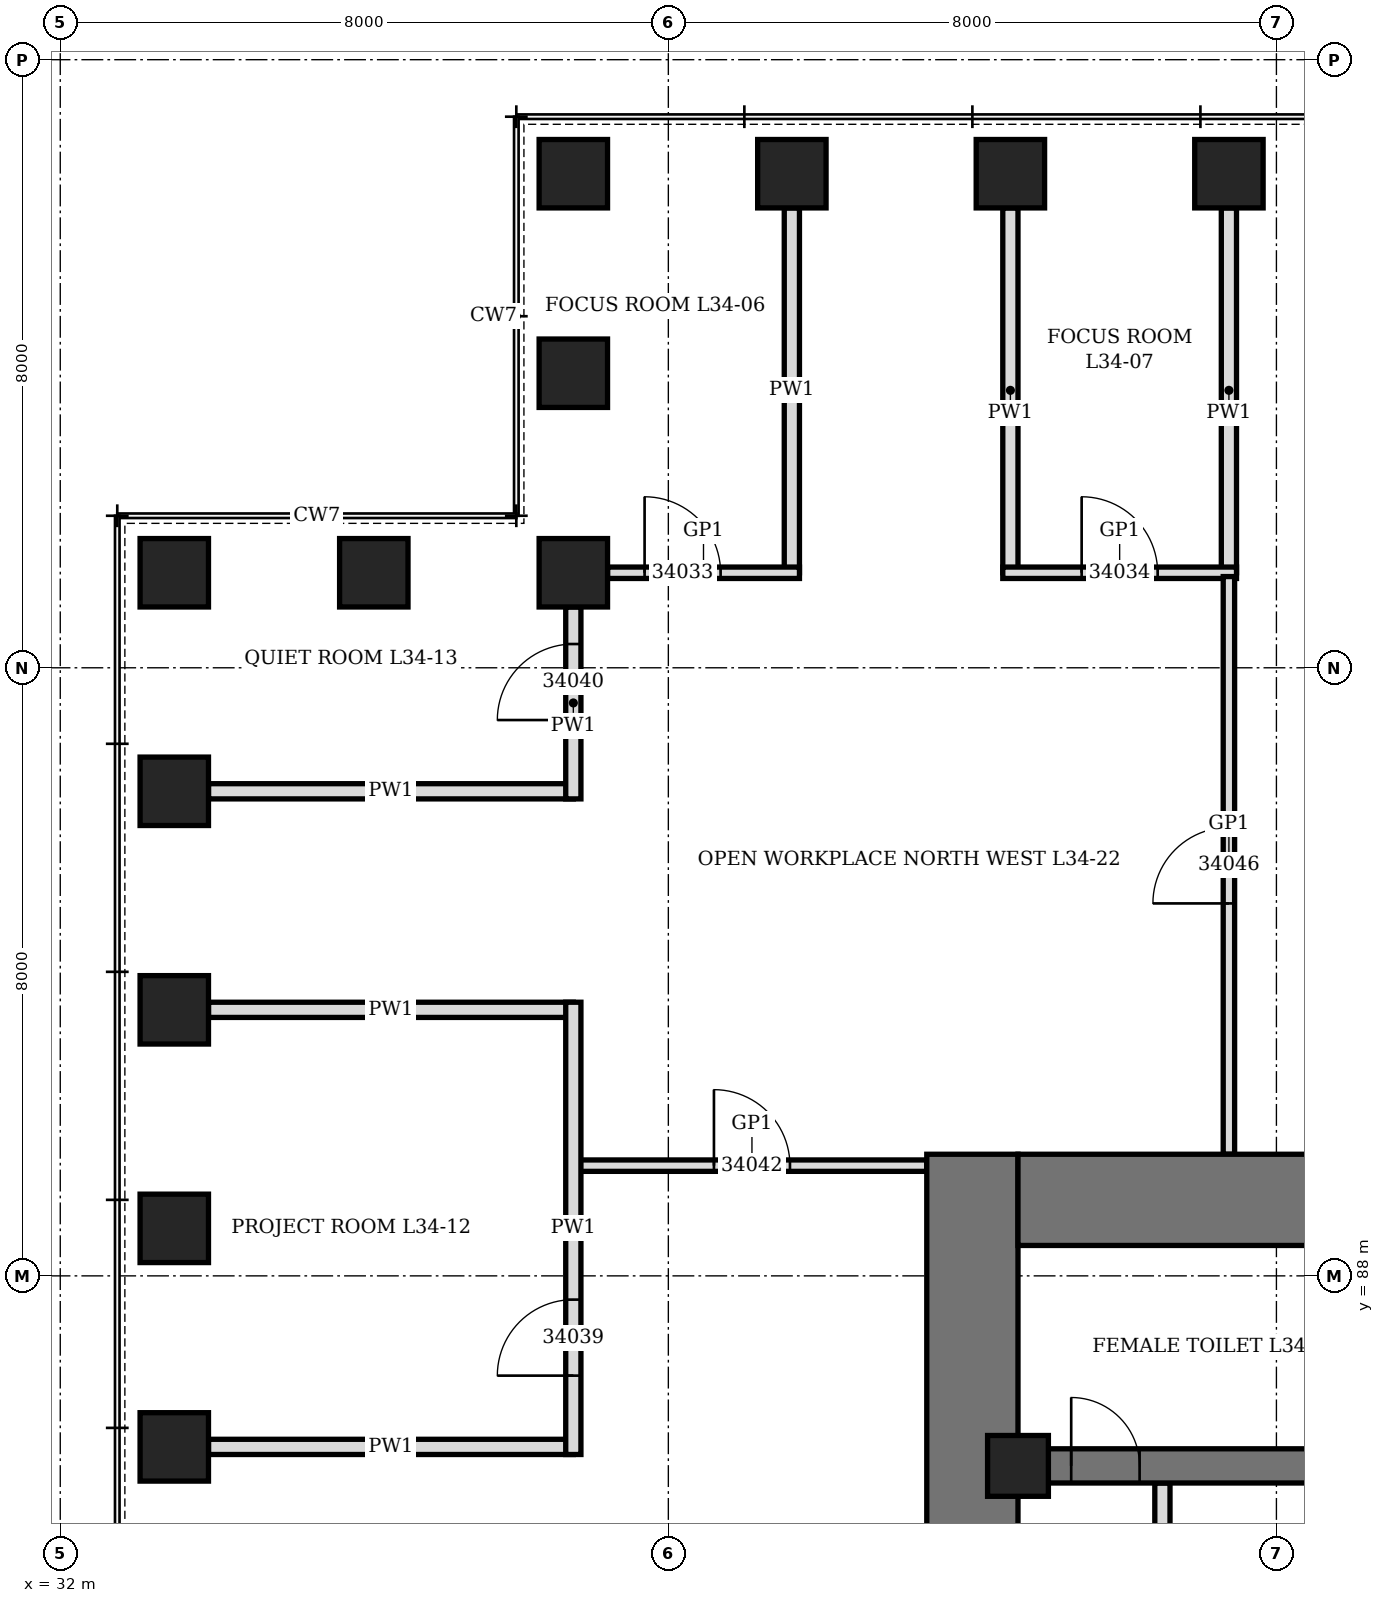
"""IFC4 building model, lengths in metres.
Left out: names, types, materials, properties, quantities, classifications, styles, units other than length and angle.
Written with IfcOpenShell. Run it as: python <this file> out.ifc"""

import sys

from ifc_helpers import new_model, si_unit, direction, frame, frame_2d, origin, origin_2d, place, context, subcontext, project, spatial, rectangle, hollow_rectangle, extrude, element, fill, save


model = new_model("IFC4")
c1 = context("Model", 3, precision=1e-05, world=origin(), true_north=direction((0.0, 1.0)))
c2 = subcontext(c1, "Body", "Model", "MODEL_VIEW")
j1 = project(units=[si_unit("LENGTHUNIT", "METRE"), si_unit("PLANEANGLEUNIT", "RADIAN")], contexts=[c1])
p1 = place(None, origin())
s1 = spatial("IfcSite", under=j1, at=p1, CompositionType="ELEMENT")
p2 = place(p1, origin())
s2 = spatial("IfcBuilding", under=s1, at=p2, CompositionType="ELEMENT")
p3 = place(p2, frame((0.0, 0.0, 154.3)))
s3 = spatial("IfcBuildingStorey", under=s2, at=p3, CompositionType="ELEMENT", Elevation=154.3)
for number, where, z_axis, x_axis in (
    (1, (47.375, 102.5, 0.0), (0.0, 0.0, 1.0), (1.0, 0.0, 0.0)),
    (2, (44.5, 102.5, 0.0), (0.0, 0.0, 1.0), (1.0, 0.0, 0.0)),
    (3, (41.625, 102.5, 0.0), (0.0, 0.0, 1.0), (1.0, 0.0, 0.0)),
    (4, (38.75, 102.5, 0.0), (0.0, 0.0, 1.0), (0.0, 1.0, 0.0)),
    (5, (38.75, 99.875, 0.0), (0.0, 0.0, 1.0), (0.0, 1.0, 0.0)),
    (6, (38.75, 97.25, 0.0), (0.0, 0.0, 1.0), (1.0, 0.0, 0.0)),
    (7, (36.125, 97.25, 0.0), (0.0, 0.0, 1.0), (1.0, 0.0, 0.0)),
    (8, (33.5, 97.25, 0.0), (0.0, 0.0, 1.0), (0.0, 1.0, 0.0)),
    (9, (33.5, 94.375, 0.0), (0.0, 0.0, 1.0), (0.0, 1.0, 0.0)),
    (10, (33.5, 91.5, 0.0), (0.0, 0.0, 1.0), (0.0, 1.0, 0.0)),
    (11, (33.5, 88.625, 0.0), (0.0, 0.0, 1.0), (0.0, 1.0, 0.0)),
    (12, (33.5, 85.75, 0.0), (0.0, 0.0, 1.0), (0.0, 1.0, 0.0)),
):
    element("IfcColumn", number, at=place(p3, frame(where, z_axis=z_axis, x_axis=x_axis)), inside=s3, PredefinedType="COLUMN", context=c2, shape_type="SweptSolid", body=[
        extrude(hollow_rectangle(XDim=0.9, YDim=0.9, WallThickness=0.12, at=origin_2d()), origin(), (0.0, 0.0, 1.0), 4.2),
    ])
p4 = place(p3, frame((44.0, 70.4, 0.0), z_axis=(0.0, 0.0, 1.0), x_axis=(0.0, 1.0, 0.0)))
e13 = element("IfcWall", 13, at=p4, inside=s3, PredefinedType="SHEAR", context=c2, shape_type="SweptSolid", body=[
    extrude(rectangle(XDim=19.2, YDim=1.2, at=frame_2d((9.6, 0.0))), origin(), (0.0, 0.0, 1.0), 4.2),
])
p5 = place(p4, frame((8.6, 0.0, 0.0)))
e14 = element("IfcOpeningElement", 14, at=p5, cuts=e13, PredefinedType="OPENING", context=c2, shape_type="SweptSolid", body=[
    extrude(rectangle(XDim=2.0, YDim=2.4, at=frame_2d((1.0, 1.2))), frame((0.0, 0.61, 0.0), z_axis=(0.0, -1.0, 0.0), x_axis=(1.0, 0.0, 0.0)), (0.0, 0.0, 1.0), 1.22),
])
p6 = place(p3, frame((44.6, 89.0, 0.0), z_axis=(0.0, 0.0, 1.0), x_axis=(1.0, 0.0, 0.0)))
e15 = element("IfcWall", 15, at=p6, inside=s3, PredefinedType="SHEAR", context=c2, shape_type="SweptSolid", body=[
    extrude(rectangle(XDim=22.8, YDim=1.2, at=frame_2d((11.4, 0.0))), origin(), (0.0, 0.0, 1.0), 4.2),
])
p7 = place(p6, frame((9.275, 0.0, 0.0)))
e16 = element("IfcOpeningElement", 16, at=p7, cuts=e15, PredefinedType="OPENING", context=c2, shape_type="SweptSolid", body=[
    extrude(rectangle(XDim=1.0, YDim=2.1, at=frame_2d((0.5, 1.05))), frame((0.0, 0.61, 0.0), z_axis=(0.0, -1.0, 0.0), x_axis=(1.0, 0.0, 0.0)), (0.0, 0.0, 1.0), 1.22),
])
p8 = place(p6, frame((6.45, 0.0, 0.0)))
e17 = element("IfcOpeningElement", 17, at=p8, cuts=e15, PredefinedType="OPENING", context=c2, shape_type="SweptSolid", body=[
    extrude(rectangle(XDim=0.9, YDim=2.1, at=frame_2d((0.45, 1.05))), frame((0.0, 0.61, 0.0), z_axis=(0.0, -1.0, 0.0), x_axis=(1.0, 0.0, 0.0)), (0.0, 0.0, 1.0), 1.22),
])
p9 = place(p6, frame((13.012, 0.0, 0.0)))
e18 = element("IfcOpeningElement", 18, at=p9, cuts=e15, PredefinedType="OPENING", context=c2, shape_type="SweptSolid", body=[
    extrude(rectangle(XDim=0.9, YDim=2.1, at=frame_2d((0.45, 1.05))), frame((0.0, 0.61, 0.0), z_axis=(0.0, -1.0, 0.0), x_axis=(1.0, 0.0, 0.0)), (0.0, 0.0, 1.0), 1.22),
])
p10 = place(p3, frame((44.6, 85.5, 0.0), z_axis=(0.0, 0.0, 1.0), x_axis=(1.0, 0.0, 0.0)))
e19 = element("IfcWall", 19, at=p10, inside=s3, PredefinedType="SHEAR", context=c2, shape_type="SweptSolid", body=[
    extrude(rectangle(XDim=5.175, YDim=0.45, at=frame_2d((2.587, 0.0))), origin(), (0.0, 0.0, 1.0), 4.2),
])
p11 = place(p10, frame((0.7, 0.0, 0.0)))
e20 = element("IfcOpeningElement", 20, at=p11, cuts=e19, PredefinedType="OPENING", context=c2, shape_type="SweptSolid", body=[
    extrude(rectangle(XDim=0.9, YDim=2.1, at=frame_2d((0.45, 1.05))), frame((0.0, 0.235, 0.0), z_axis=(0.0, -1.0, 0.0), x_axis=(1.0, 0.0, 0.0)), (0.0, 0.0, 1.0), 0.47),
])
p12 = place(p3, frame((44.6, 85.5, 0.0), z_axis=(0.0, 0.0, 1.0), x_axis=(1.0, 0.0, 0.0)))
e21 = element("IfcColumn", 21, at=p12, inside=s3, PredefinedType="COLUMN", context=c2, shape_type="SweptSolid", body=[
    extrude(hollow_rectangle(XDim=0.8, YDim=0.8, WallThickness=0.1, at=origin_2d()), origin(), (0.0, 0.0, 1.0), 4.2),
])
p13 = place(p3, frame((46.5, 82.225, 0.0), z_axis=(0.0, 0.0, 1.0), x_axis=(0.0, 1.0, 0.0)))
e22 = element("IfcWall", 22, at=p13, inside=s3, PredefinedType="PARTITIONING", context=c2, shape_type="SweptSolid", body=[
    extrude(rectangle(XDim=3.05, YDim=0.2, at=frame_2d((1.525, 0.0))), origin(), (0.0, 0.0, 1.0), 4.04),
])
p14 = place(p13, frame((1.075, 0.0, 0.0)))
e23 = element("IfcOpeningElement", 23, at=p14, cuts=e22, PredefinedType="OPENING", context=c2, shape_type="SweptSolid", body=[
    extrude(rectangle(XDim=0.9, YDim=2.1, at=frame_2d((0.45, 1.05))), frame((0.0, 0.11, 0.0), z_axis=(0.0, -1.0, 0.0), x_axis=(1.0, 0.0, 0.0)), (0.0, 0.0, 1.0), 0.22),
])
p15 = place(p3, frame((41.625, 97.25, 0.0), z_axis=(0.0, 0.0, 1.0), x_axis=(0.0, 1.0, 0.0)))
e24 = element("IfcWall", 24, at=p15, inside=s3, PredefinedType="PARTITIONING", context=c2, shape_type="SweptSolid", body=[
    extrude(rectangle(XDim=4.8, YDim=0.2, at=frame_2d((2.4, 0.0))), origin(), (0.0, 0.0, 1.0), 3.428),
])
p16 = place(p3, frame((44.5, 97.25, 0.0), z_axis=(0.0, 0.0, 1.0), x_axis=(0.0, 1.0, 0.0)))
e25 = element("IfcWall", 25, at=p16, inside=s3, PredefinedType="PARTITIONING", context=c2, shape_type="SweptSolid", body=[
    extrude(rectangle(XDim=4.8, YDim=0.2, at=frame_2d((2.4, 0.0))), origin(), (0.0, 0.0, 1.0), 2.74),
])
p17 = place(p3, frame((47.375, 97.25, 0.0), z_axis=(0.0, 0.0, 1.0), x_axis=(0.0, 1.0, 0.0)))
e26 = element("IfcWall", 26, at=p17, inside=s3, PredefinedType="PARTITIONING", context=c2, shape_type="SweptSolid", body=[
    extrude(rectangle(XDim=4.8, YDim=0.2, at=frame_2d((2.4, 0.0))), origin(), (0.0, 0.0, 1.0), 3.278),
])
for number, where, z_axis, x_axis in (
    (27, (33.95, 85.75, 0.0), (0.0, 0.0, 1.0), (1.0, 0.0, 0.0)),
    (28, (33.95, 91.5, 0.0), (0.0, 0.0, 1.0), (1.0, 0.0, 0.0)),
    (29, (33.95, 94.375, 0.0), (0.0, 0.0, 1.0), (1.0, 0.0, 0.0)),
):
    element("IfcWall", number, at=place(p3, frame(where, z_axis=z_axis, x_axis=x_axis)), inside=s3, PredefinedType="PARTITIONING", context=c2, shape_type="SweptSolid", body=[
        extrude(rectangle(XDim=4.8, YDim=0.2, at=frame_2d((2.4, 0.0))), origin(), (0.0, 0.0, 1.0), 3.428),
    ])
p18 = place(p3, frame((38.8, 89.45, 0.0), z_axis=(0.0, 0.0, 1.0), x_axis=(1.0, 0.0, 0.0)))
e30 = element("IfcWall", 30, at=p18, inside=s3, PredefinedType="PARTITIONING", context=c2, shape_type="SweptSolid", body=[
    extrude(rectangle(XDim=4.6, YDim=0.15, at=frame_2d((2.3, 0.0))), origin(), (0.0, 0.0, 1.0), 4.04),
])
p19 = place(p18, frame((1.8, 0.0, 0.0)))
e31 = element("IfcOpeningElement", 31, at=p19, cuts=e30, PredefinedType="OPENING", context=c2, shape_type="SweptSolid", body=[
    extrude(rectangle(XDim=1.0, YDim=2.4, at=frame_2d((0.5, 1.2))), frame((0.0, 0.085, 0.0), z_axis=(0.0, -1.0, 0.0), x_axis=(1.0, 0.0, 0.0)), (0.0, 0.0, 1.0), 0.17),
])
p20 = place(p3, frame((39.2, 97.25, 0.0), z_axis=(0.0, 0.0, 1.0), x_axis=(1.0, 0.0, 0.0)))
e32 = element("IfcWall", 32, at=p20, inside=s3, PredefinedType="PARTITIONING", context=c2, shape_type="SweptSolid", body=[
    extrude(rectangle(XDim=2.525, YDim=0.15, at=frame_2d((1.263, 0.0))), origin(), (0.0, 0.0, 1.0), 4.04),
])
p21 = place(p20, frame((0.488, 0.0, 0.0)))
e33 = element("IfcOpeningElement", 33, at=p21, cuts=e32, PredefinedType="OPENING", context=c2, shape_type="SweptSolid", body=[
    extrude(rectangle(XDim=1.0, YDim=2.4, at=frame_2d((0.5, 1.2))), frame((0.0, 0.085, 0.0), z_axis=(0.0, -1.0, 0.0), x_axis=(1.0, 0.0, 0.0)), (0.0, 0.0, 1.0), 0.17),
])
p22 = place(p3, frame((44.4, 97.25, 0.0), z_axis=(0.0, 0.0, 1.0), x_axis=(1.0, 0.0, 0.0)))
e34 = element("IfcWall", 34, at=p22, inside=s3, PredefinedType="PARTITIONING", context=c2, shape_type="SweptSolid", body=[
    extrude(rectangle(XDim=3.075, YDim=0.15, at=frame_2d((1.538, 0.0))), origin(), (0.0, 0.0, 1.0), 4.04),
])
p23 = place(p22, frame((1.038, 0.0, 0.0)))
e35 = element("IfcOpeningElement", 35, at=p23, cuts=e34, PredefinedType="OPENING", context=c2, shape_type="SweptSolid", body=[
    extrude(rectangle(XDim=1.0, YDim=2.4, at=frame_2d((0.5, 1.2))), frame((0.0, 0.085, 0.0), z_axis=(0.0, -1.0, 0.0), x_axis=(1.0, 0.0, 0.0)), (0.0, 0.0, 1.0), 0.17),
])
p24 = place(p3, frame((38.75, 85.65, 0.0), z_axis=(0.0, 0.0, 1.0), x_axis=(0.0, 1.0, 0.0)))
e36 = element("IfcWall", 36, at=p24, inside=s3, PredefinedType="PARTITIONING", context=c2, shape_type="SweptSolid", body=[
    extrude(rectangle(XDim=5.95, YDim=0.2, at=frame_2d((2.975, 0.0))), origin(), (0.0, 0.0, 1.0), 4.04),
])
p25 = place(p24, frame((1.038, 0.0, 0.0)))
e37 = element("IfcOpeningElement", 37, at=p25, cuts=e36, PredefinedType="OPENING", context=c2, shape_type="SweptSolid", body=[
    extrude(rectangle(XDim=1.0, YDim=2.1, at=frame_2d((0.5, 1.05))), frame((0.0, 0.11, 0.0), z_axis=(0.0, -1.0, 0.0), x_axis=(1.0, 0.0, 0.0)), (0.0, 0.0, 1.0), 0.22),
])
p26 = place(p3, frame((38.75, 94.275, 0.0), z_axis=(0.0, 0.0, 1.0), x_axis=(0.0, 1.0, 0.0)))
e38 = element("IfcWall", 38, at=p26, inside=s3, PredefinedType="PARTITIONING", context=c2, shape_type="SweptSolid", body=[
    extrude(rectangle(XDim=2.525, YDim=0.2, at=frame_2d((1.263, 0.0))), origin(), (0.0, 0.0, 1.0), 4.04),
])
p27 = place(p26, frame((1.038, 0.0, 0.0)))
e39 = element("IfcOpeningElement", 39, at=p27, cuts=e38, PredefinedType="OPENING", context=c2, shape_type="SweptSolid", body=[
    extrude(rectangle(XDim=1.0, YDim=2.1, at=frame_2d((0.5, 1.05))), frame((0.0, 0.11, 0.0), z_axis=(0.0, -1.0, 0.0), x_axis=(1.0, 0.0, 0.0)), (0.0, 0.0, 1.0), 0.22),
])
p28 = place(p3, frame((47.375, 89.6, 0.0), z_axis=(0.0, 0.0, 1.0), x_axis=(0.0, 1.0, 0.0)))
e40 = element("IfcWall", 40, at=p28, inside=s3, PredefinedType="PARTITIONING", context=c2, shape_type="SweptSolid", body=[
    extrude(rectangle(XDim=7.6, YDim=0.15, at=frame_2d((3.8, 0.0))), origin(), (0.0, 0.0, 1.0), 3.278),
])
p29 = place(p28, frame((3.3, 0.0, 0.0)))
e41 = element("IfcOpeningElement", 41, at=p29, cuts=e40, PredefinedType="OPENING", context=c2, shape_type="SweptSolid", body=[
    extrude(rectangle(XDim=1.0, YDim=2.4, at=frame_2d((0.5, 1.2))), frame((0.0, 0.085, 0.0), z_axis=(0.0, -1.0, 0.0), x_axis=(1.0, 0.0, 0.0)), (0.0, 0.0, 1.0), 0.17),
])
p30 = place(p11, origin())
e42 = element("IfcDoor", 42, at=p30, inside=s3, OperationType="SINGLE_SWING_RIGHT", PredefinedType="DOOR", context=c2, shape_type="SweptSolid", body=[
    extrude(rectangle(XDim=0.9, YDim=2.1, at=frame_2d((0.45, 1.05))), frame((0.0, 0.225, 0.0), z_axis=(0.0, -1.0, 0.0), x_axis=(1.0, 0.0, 0.0)), (0.0, 0.0, 1.0), 0.449),
])
fill(e20, e42)
p31 = place(p21, origin())
e43 = element("IfcDoor", 43, at=p31, inside=s3, OperationType="SINGLE_SWING_RIGHT", PredefinedType="DOOR", context=c2, shape_type="SweptSolid", body=[
    extrude(rectangle(XDim=1.0, YDim=2.4, at=frame_2d((0.5, 1.2))), frame((0.0, 0.075, 0.0), z_axis=(0.0, -1.0, 0.0), x_axis=(1.0, 0.0, 0.0)), (0.0, 0.0, 1.0), 0.149),
])
fill(e33, e43)
p32 = place(p23, origin())
e44 = element("IfcDoor", 44, at=p32, inside=s3, OperationType="SINGLE_SWING_RIGHT", PredefinedType="DOOR", context=c2, shape_type="SweptSolid", body=[
    extrude(rectangle(XDim=1.0, YDim=2.4, at=frame_2d((0.5, 1.2))), frame((0.0, 0.075, 0.0), z_axis=(0.0, -1.0, 0.0), x_axis=(1.0, 0.0, 0.0)), (0.0, 0.0, 1.0), 0.149),
])
fill(e35, e44)
p33 = place(p25, origin())
e45 = element("IfcDoor", 45, at=p33, inside=s3, OperationType="SINGLE_SWING_LEFT", PredefinedType="DOOR", context=c2, shape_type="SweptSolid", body=[
    extrude(rectangle(XDim=1.0, YDim=2.1, at=frame_2d((0.5, 1.05))), frame((0.0, 0.1, 0.0), z_axis=(0.0, -1.0, 0.0), x_axis=(1.0, 0.0, 0.0)), (0.0, 0.0, 1.0), 0.199),
])
fill(e37, e45)
p34 = place(p27, origin())
e46 = element("IfcDoor", 46, at=p34, inside=s3, OperationType="SINGLE_SWING_LEFT", PredefinedType="DOOR", context=c2, shape_type="SweptSolid", body=[
    extrude(rectangle(XDim=1.0, YDim=2.1, at=frame_2d((0.5, 1.05))), frame((0.0, 0.1, 0.0), z_axis=(0.0, -1.0, 0.0), x_axis=(1.0, 0.0, 0.0)), (0.0, 0.0, 1.0), 0.199),
])
fill(e39, e46)
p35 = place(p19, origin())
e47 = element("IfcDoor", 47, at=p35, inside=s3, OperationType="SINGLE_SWING_RIGHT", PredefinedType="DOOR", context=c2, shape_type="SweptSolid", body=[
    extrude(rectangle(XDim=1.0, YDim=2.4, at=frame_2d((0.5, 1.2))), frame((0.0, 0.075, 0.0), z_axis=(0.0, -1.0, 0.0), x_axis=(1.0, 0.0, 0.0)), (0.0, 0.0, 1.0), 0.149),
])
fill(e31, e47)
p36 = place(p29, origin())
e48 = element("IfcDoor", 48, at=p36, inside=s3, OperationType="SINGLE_SWING_RIGHT", PredefinedType="DOOR", context=c2, shape_type="SweptSolid", body=[
    extrude(rectangle(XDim=1.0, YDim=2.4, at=frame_2d((0.5, 1.2))), frame((0.0, 0.075, 0.0), z_axis=(0.0, -1.0, 0.0), x_axis=(1.0, 0.0, 0.0)), (0.0, 0.0, 1.0), 0.149),
])
fill(e41, e48)
save(model, sys.argv[1])
